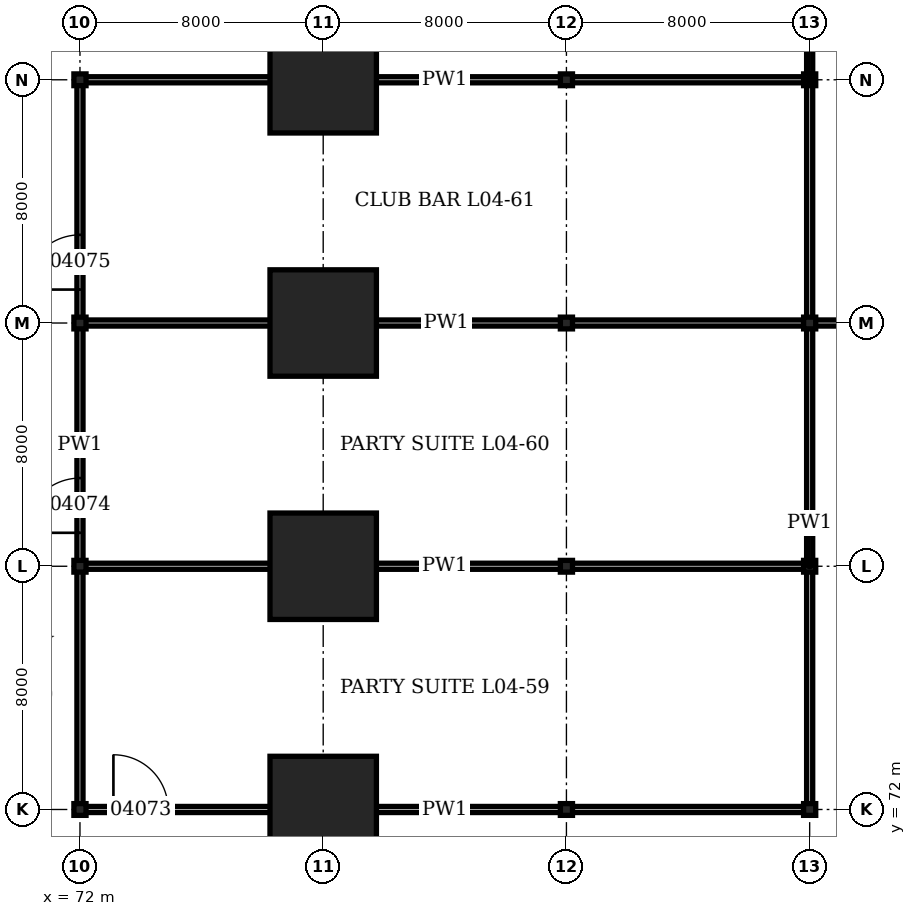
"""IFC4 building model, lengths in metres.
Left out: names, types, materials, properties, quantities, classifications, styles, units other than length and angle.
Written with IfcOpenShell. Run it as: python <this file> out.ifc"""

import sys

from ifc_helpers import new_model, si_unit, direction, frame, frame_2d, origin, origin_2d, place, context, subcontext, project, spatial, rectangle, hollow_rectangle, i_section, extrude, element, fill, save


model = new_model("IFC4")
c1 = context("Model", 3, precision=1e-05, world=origin(), true_north=direction((0.0, 1.0)))
c2 = subcontext(c1, "Body", "Model", "MODEL_VIEW")
j1 = project(units=[si_unit("LENGTHUNIT", "METRE"), si_unit("PLANEANGLEUNIT", "RADIAN")], contexts=[c1])
p1 = place(None, origin())
s1 = spatial("IfcSite", under=j1, at=p1, CompositionType="ELEMENT")
p2 = place(p1, origin())
s2 = spatial("IfcBuilding", under=s1, at=p2, CompositionType="ELEMENT")
p3 = place(p2, frame((0.0, 0.0, 19.9)))
s3 = spatial("IfcBuildingStorey", under=s2, at=p3, CompositionType="ELEMENT", Elevation=19.9)
for number, where, z_axis, x_axis in (
    (1, (72.0, 72.0, 0.0), (0.0, 0.0, 1.0), (1.0, 0.0, 0.0)),
    (2, (72.0, 80.0, 0.0), (0.0, 0.0, 1.0), (1.0, 0.0, 0.0)),
    (3, (72.0, 88.0, 0.0), (0.0, 0.0, 1.0), (1.0, 0.0, 0.0)),
    (4, (72.0, 96.0, 0.0), (0.0, 0.0, 1.0), (1.0, 0.0, 0.0)),
):
    element("IfcColumn", number, at=place(p3, frame(where, z_axis=z_axis, x_axis=x_axis)), inside=s3, PredefinedType="COLUMN", context=c2, shape_type="SweptSolid", body=[
        extrude(i_section(OverallWidth=0.399, OverallDepth=0.386, WebThickness=0.021, FlangeThickness=0.033, at=origin_2d()), origin(), (0.0, 0.0, 1.0), 6.0),
    ])
for number, where, z_axis, x_axis in (
    (5, (80.0, 72.0, 0.0), (0.0, 0.0, 1.0), (1.0, 0.0, 0.0)),
    (6, (80.0, 80.0, 0.0), (0.0, 0.0, 1.0), (1.0, 0.0, 0.0)),
    (7, (80.0, 88.0, 0.0), (0.0, 0.0, 1.0), (1.0, 0.0, 0.0)),
    (8, (80.0, 96.0, 0.0), (0.0, 0.0, 1.0), (1.0, 0.0, 0.0)),
):
    element("IfcColumn", number, at=place(p3, frame(where, z_axis=z_axis, x_axis=x_axis)), inside=s3, PredefinedType="COLUMN", context=c2, shape_type="SweptSolid", body=[
        extrude(hollow_rectangle(XDim=3.5, YDim=3.5, WallThickness=0.5, at=origin_2d()), origin(), (0.0, 0.0, 1.0), 6.0),
    ])
for number, where, z_axis, x_axis in (
    (9, (88.0, 72.0, 0.0), (0.0, 0.0, 1.0), (1.0, 0.0, 0.0)),
    (10, (88.0, 80.0, 0.0), (0.0, 0.0, 1.0), (1.0, 0.0, 0.0)),
    (11, (88.0, 88.0, 0.0), (0.0, 0.0, 1.0), (1.0, 0.0, 0.0)),
    (12, (88.0, 96.0, 0.0), (0.0, 0.0, 1.0), (1.0, 0.0, 0.0)),
    (13, (96.0, 72.0, 0.0), (0.0, 0.0, 1.0), (1.0, 0.0, 0.0)),
    (14, (96.0, 80.0, 0.0), (0.0, 0.0, 1.0), (1.0, 0.0, 0.0)),
    (15, (96.0, 88.0, 0.0), (0.0, 0.0, 1.0), (1.0, 0.0, 0.0)),
    (16, (96.0, 96.0, 0.0), (0.0, 0.0, 1.0), (1.0, 0.0, 0.0)),
):
    element("IfcColumn", number, at=place(p3, frame(where, z_axis=z_axis, x_axis=x_axis)), inside=s3, PredefinedType="COLUMN", context=c2, shape_type="SweptSolid", body=[
        extrude(i_section(OverallWidth=0.399, OverallDepth=0.386, WebThickness=0.021, FlangeThickness=0.033, at=origin_2d()), origin(), (0.0, 0.0, 1.0), 6.0),
    ])
p4 = place(p3, frame((72.1, 72.0, 0.0), z_axis=(0.0, 0.0, 1.0), x_axis=(1.0, 0.0, 0.0)))
e17 = element("IfcWall", 17, at=p4, inside=s3, PredefinedType="PARTITIONING", context=c2, shape_type="SweptSolid", body=[
    extrude(rectangle(XDim=23.8, YDim=0.2, at=frame_2d((11.9, 0.0))), origin(), (0.0, 0.0, 1.0), 4.978),
])
p5 = place(p4, frame((1.0, 0.0, 0.0)))
e18 = element("IfcOpeningElement", 18, at=p5, cuts=e17, PredefinedType="OPENING", context=c2, shape_type="SweptSolid", body=[
    extrude(rectangle(XDim=1.8, YDim=2.4, at=frame_2d((0.9, 1.2))), frame((0.0, 0.11, 0.0), z_axis=(0.0, -1.0, 0.0), x_axis=(1.0, 0.0, 0.0)), (0.0, 0.0, 1.0), 0.22),
])
p6 = place(p3, frame((72.1, 80.0, 0.0), z_axis=(0.0, 0.0, 1.0), x_axis=(1.0, 0.0, 0.0)))
e19 = element("IfcWall", 19, at=p6, inside=s3, PredefinedType="PARTITIONING", context=c2, shape_type="SweptSolid", body=[
    extrude(rectangle(XDim=23.8, YDim=0.2, at=frame_2d((11.9, 0.0))), origin(), (0.0, 0.0, 1.0), 4.978),
])
p7 = place(p3, frame((72.1, 88.0, 0.0), z_axis=(0.0, 0.0, 1.0), x_axis=(1.0, 0.0, 0.0)))
e20 = element("IfcWall", 20, at=p7, inside=s3, PredefinedType="PARTITIONING", context=c2, shape_type="SweptSolid", body=[
    extrude(rectangle(XDim=23.9, YDim=0.2, at=frame_2d((11.95, 0.0))), origin(), (0.0, 0.0, 1.0), 4.978),
])
p8 = place(p3, frame((96.0, 88.0, 0.0), z_axis=(0.0, 0.0, 1.0), x_axis=(1.0, 0.0, 0.0)))
e21 = element("IfcWall", 21, at=p8, inside=s3, PredefinedType="PARTITIONING", context=c2, shape_type="SweptSolid", body=[
    extrude(rectangle(XDim=7.9, YDim=0.2, at=frame_2d((3.95, 0.0))), origin(), (0.0, 0.0, 1.0), 4.978),
])
p9 = place(p8, frame((1.25, 0.0, 0.0)))
e22 = element("IfcOpeningElement", 22, at=p9, cuts=e21, PredefinedType="OPENING", context=c2, shape_type="SweptSolid", body=[
    extrude(rectangle(XDim=1.5, YDim=2.4, at=frame_2d((0.75, 1.2))), frame((0.0, 0.11, 0.0), z_axis=(0.0, -1.0, 0.0), x_axis=(1.0, 0.0, 0.0)), (0.0, 0.0, 1.0), 0.22),
])
p10 = place(p3, frame((72.1, 96.0, 0.0), z_axis=(0.0, 0.0, 1.0), x_axis=(1.0, 0.0, 0.0)))
e23 = element("IfcWall", 23, at=p10, inside=s3, PredefinedType="PARTITIONING", context=c2, shape_type="SweptSolid", body=[
    extrude(rectangle(XDim=23.8, YDim=0.2, at=frame_2d((11.9, 0.0))), origin(), (0.0, 0.0, 1.0), 4.978),
])
p11 = place(p3, frame((72.0, 72.1, 0.0), z_axis=(0.0, 0.0, 1.0), x_axis=(0.0, 1.0, 0.0)))
e24 = element("IfcWall", 24, at=p11, inside=s3, PredefinedType="PARTITIONING", context=c2, shape_type="SweptSolid", body=[
    extrude(rectangle(XDim=23.8, YDim=0.2, at=frame_2d((11.9, 0.0))), origin(), (0.0, 0.0, 1.0), 4.978),
])
p12 = place(p11, frame((9.0, 0.0, 0.0)))
e25 = element("IfcOpeningElement", 25, at=p12, cuts=e24, PredefinedType="OPENING", context=c2, shape_type="SweptSolid", body=[
    extrude(rectangle(XDim=1.8, YDim=2.4, at=frame_2d((0.9, 1.2))), frame((0.0, 0.11, 0.0), z_axis=(0.0, -1.0, 0.0), x_axis=(1.0, 0.0, 0.0)), (0.0, 0.0, 1.0), 0.22),
])
p13 = place(p11, frame((17.0, 0.0, 0.0)))
e26 = element("IfcOpeningElement", 26, at=p13, cuts=e24, PredefinedType="OPENING", context=c2, shape_type="SweptSolid", body=[
    extrude(rectangle(XDim=1.8, YDim=2.4, at=frame_2d((0.9, 1.2))), frame((0.0, 0.11, 0.0), z_axis=(0.0, -1.0, 0.0), x_axis=(1.0, 0.0, 0.0)), (0.0, 0.0, 1.0), 0.22),
])
p14 = place(p3, frame((96.0, 72.1, 0.0), z_axis=(0.0, 0.0, 1.0), x_axis=(0.0, 1.0, 0.0)))
e27 = element("IfcWall", 27, at=p14, inside=s3, PredefinedType="PARTITIONING", context=c2, shape_type="SweptSolid", body=[
    extrude(rectangle(XDim=15.9, YDim=0.2, at=frame_2d((7.95, 0.0))), origin(), (0.0, 0.0, 1.0), 4.978),
])
p15 = place(p3, frame((96.0, 88.0, 0.0), z_axis=(0.0, 0.0, 1.0), x_axis=(0.0, 1.0, 0.0)))
e28 = element("IfcWall", 28, at=p15, inside=s3, PredefinedType="PARTITIONING", context=c2, shape_type="SweptSolid", body=[
    extrude(rectangle(XDim=16.0, YDim=0.2, at=frame_2d((8.0, 0.0))), origin(), (0.0, 0.0, 1.0), 4.978),
])
p16 = place(p5, origin())
e29 = element("IfcDoor", 29, at=p16, inside=s3, OperationType="DOUBLE_DOOR_DOUBLE_SWING", PredefinedType="DOOR", context=c2, shape_type="SweptSolid", body=[
    extrude(rectangle(XDim=1.8, YDim=2.4, at=frame_2d((0.9, 1.2))), frame((0.0, 0.1, 0.0), z_axis=(0.0, -1.0, 0.0), x_axis=(1.0, 0.0, 0.0)), (0.0, 0.0, 1.0), 0.199),
])
fill(e18, e29)
p17 = place(p12, origin())
e30 = element("IfcDoor", 30, at=p17, inside=s3, OperationType="DOUBLE_DOOR_DOUBLE_SWING", PredefinedType="DOOR", context=c2, shape_type="SweptSolid", body=[
    extrude(rectangle(XDim=1.8, YDim=2.4, at=frame_2d((0.9, 1.2))), frame((0.0, 0.1, 0.0), z_axis=(0.0, -1.0, 0.0), x_axis=(1.0, 0.0, 0.0)), (0.0, 0.0, 1.0), 0.199),
])
fill(e25, e30)
p18 = place(p13, origin())
e31 = element("IfcDoor", 31, at=p18, inside=s3, OperationType="DOUBLE_DOOR_DOUBLE_SWING", PredefinedType="DOOR", context=c2, shape_type="SweptSolid", body=[
    extrude(rectangle(XDim=1.8, YDim=2.4, at=frame_2d((0.9, 1.2))), frame((0.0, 0.1, 0.0), z_axis=(0.0, -1.0, 0.0), x_axis=(1.0, 0.0, 0.0)), (0.0, 0.0, 1.0), 0.199),
])
fill(e26, e31)
save(model, sys.argv[1])
